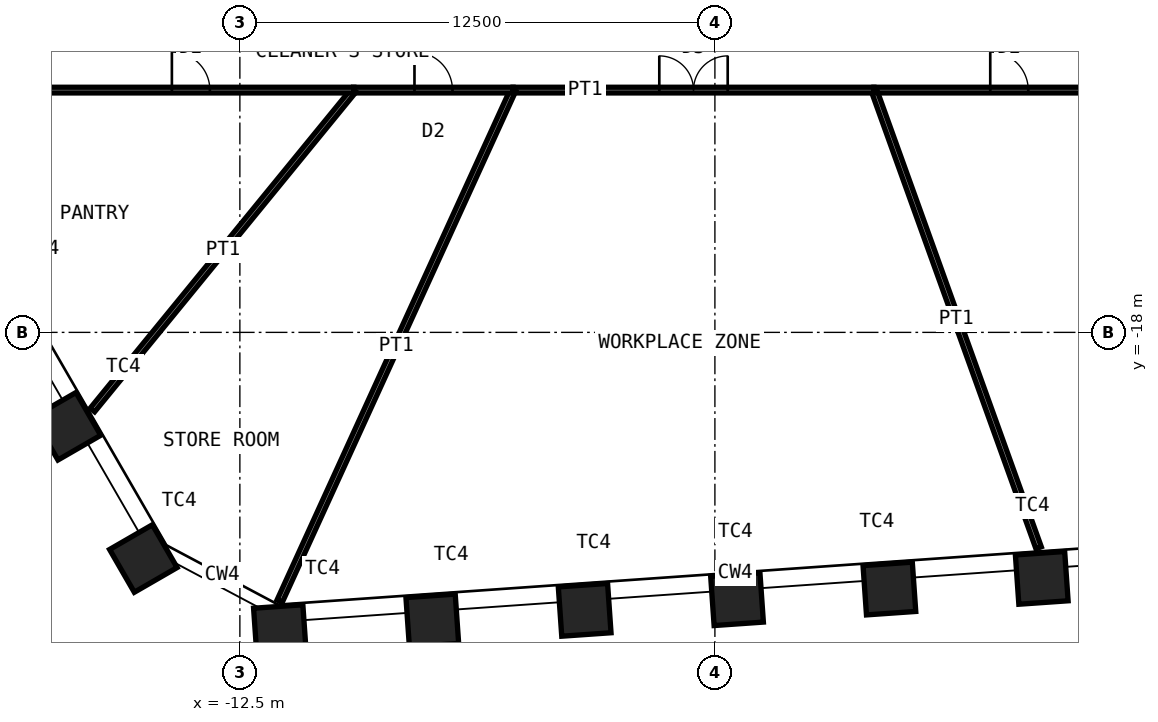
"""IFC4 building model, lengths in metres.
Left out: names, types, materials, properties, quantities, classifications, styles, units other than length and angle.
Written with IfcOpenShell. Run it as: python <this file> out.ifc"""

import sys

from ifc_helpers import new_model, si_unit, direction, frame, frame_2d, origin, origin_2d, place, context, subcontext, project, spatial, rectangle, hollow_rectangle, extrude, element, fill, save


model = new_model("IFC4")
c1 = context("Model", 3, precision=1e-05, world=origin(), true_north=direction((0.0, 1.0)))
c2 = subcontext(c1, "Body", "Model", "MODEL_VIEW")
j1 = project(units=[si_unit("LENGTHUNIT", "METRE"), si_unit("PLANEANGLEUNIT", "RADIAN")], contexts=[c1])
p1 = place(None, origin())
s1 = spatial("IfcSite", under=j1, at=p1, CompositionType="ELEMENT")
p2 = place(p1, origin())
s2 = spatial("IfcBuilding", under=s1, at=p2, CompositionType="ELEMENT")
p3 = place(p2, frame((0.0, 0.0, 157.6)))
s3 = spatial("IfcBuildingStorey", under=s2, at=p3, CompositionType="ELEMENT", Elevation=157.6)
for number, where, z_axis, x_axis in (
    (1, (8.601, -24.46, 0.0), (0.0, 0.0, 1.0), (0.998, 0.07, 0.0)),
    (2, (4.592, -24.74, 0.0), (0.0, 0.0, 1.0), (0.998, 0.07, 0.0)),
    (3, (0.582, -25.02, 0.0), (0.0, 0.0, 1.0), (0.998, 0.07, 0.0)),
    (4, (-3.427, -25.301, 0.0), (0.0, 0.0, 1.0), (0.998, 0.07, 0.0)),
    (5, (-7.436, -25.581, 0.0), (0.0, 0.0, 1.0), (0.998, 0.07, 0.0)),
    (6, (-11.446, -25.861, 0.0), (0.0, 0.0, 1.0), (0.998, 0.07, 0.0)),
    (7, (-15.04, -23.95, 0.0), (0.0, 0.0, 1.0), (0.5, -0.866, 0.0)),
    (8, (-17.049, -20.47, 0.0), (0.0, 0.0, 1.0), (0.5, -0.866, 0.0)),
):
    element("IfcColumn", number, at=place(p3, frame(where, z_axis=z_axis, x_axis=x_axis)), inside=s3, PredefinedType="COLUMN", context=c2, shape_type="SweptSolid", body=[
        extrude(hollow_rectangle(XDim=1.3, YDim=1.3, WallThickness=0.1, at=origin_2d()), origin(), (0.0, 0.0, 1.0), 4.2),
    ])
p4 = place(p3, frame((11.307, -11.625, 0.0), z_axis=(0.0, 0.0, 1.0), x_axis=(-1.0, 0.0, 0.0)))
e9 = element("IfcWall", 9, at=p4, inside=s3, PredefinedType="PARTITIONING", context=c2, shape_type="SweptSolid", body=[
    extrude(rectangle(XDim=7.123, YDim=0.15, at=frame_2d((3.562, 0.0))), origin(), (0.0, 0.0, 1.0), 4.03),
])
p5 = place(p4, frame((3.062, 0.0, 0.0)))
e10 = element("IfcOpeningElement", 10, at=p5, cuts=e9, PredefinedType="OPENING", context=c2, shape_type="SweptSolid", body=[
    extrude(rectangle(XDim=1.0, YDim=2.4, at=frame_2d((0.5, 1.2))), frame((0.0, 0.085, 0.0), z_axis=(0.0, -1.0, 0.0), x_axis=(1.0, 0.0, 0.0)), (0.0, 0.0, 1.0), 0.17),
])
p6 = place(p3, frame((8.518, -23.667, 0.0), z_axis=(0.0, 0.0, 1.0), x_axis=(-0.338635030469, 0.940917805198, 0.0)))
e11 = element("IfcWall", 11, at=p6, inside=s3, PredefinedType="PARTITIONING", context=c2, shape_type="SweptSolid", body=[
    extrude(rectangle(XDim=12.798, YDim=0.15, at=frame_2d((6.399, 0.0))), origin(), (0.0, 0.0, 1.0), 3.33),
])
p7 = place(p3, frame((4.184, -11.625, 0.0), z_axis=(0.0, 0.0, 1.0), x_axis=(-1.0, 0.0, 0.0)))
e12 = element("IfcWall", 12, at=p7, inside=s3, PredefinedType="PARTITIONING", context=c2, shape_type="SweptSolid", body=[
    extrude(rectangle(XDim=9.494, YDim=0.15, at=frame_2d((4.747, 0.0))), origin(), (0.0, 0.0, 1.0), 4.03),
])
p8 = place(p7, frame((3.847, 0.0, 0.0)))
e13 = element("IfcOpeningElement", 13, at=p8, cuts=e12, PredefinedType="OPENING", context=c2, shape_type="SweptSolid", body=[
    extrude(rectangle(XDim=1.8, YDim=2.4, at=frame_2d((0.9, 1.2))), frame((0.0, 0.085, 0.0), z_axis=(0.0, -1.0, 0.0), x_axis=(1.0, 0.0, 0.0)), (0.0, 0.0, 1.0), 0.17),
])
p9 = place(p3, frame((-11.453, -25.072, 0.0), z_axis=(0.0, 0.0, 1.0), x_axis=(0.415494357555, 0.909595755729, 0.0)))
e14 = element("IfcWall", 14, at=p9, inside=s3, PredefinedType="PARTITIONING", context=c2, shape_type="SweptSolid", body=[
    extrude(rectangle(XDim=14.784, YDim=0.15, at=frame_2d((7.392, 0.0))), origin(), (0.0, 0.0, 1.0), 2.93),
])
p10 = place(p3, frame((-5.31, -11.625, 0.0), z_axis=(0.0, 0.0, 1.0), x_axis=(-1.0, 0.0, 0.0)))
e15 = element("IfcWall", 15, at=p10, inside=s3, PredefinedType="PARTITIONING", context=c2, shape_type="SweptSolid", body=[
    extrude(rectangle(XDim=4.19, YDim=0.15, at=frame_2d((2.095, 0.0))), origin(), (0.0, 0.0, 1.0), 4.03),
])
p11 = place(p10, frame((1.595, 0.0, 0.0)))
e16 = element("IfcOpeningElement", 16, at=p11, cuts=e15, PredefinedType="OPENING", context=c2, shape_type="SweptSolid", body=[
    extrude(rectangle(XDim=1.0, YDim=2.4, at=frame_2d((0.5, 1.2))), frame((0.0, 0.085, 0.0), z_axis=(0.0, -1.0, 0.0), x_axis=(1.0, 0.0, 0.0)), (0.0, 0.0, 1.0), 0.17),
])
p12 = place(p3, frame((-16.38, -20.042, 0.0), z_axis=(0.0, 0.0, 1.0), x_axis=(0.632814540967, 0.774303400962, 0.0)))
e17 = element("IfcWall", 17, at=p12, inside=s3, PredefinedType="PARTITIONING", context=c2, shape_type="SweptSolid", body=[
    extrude(rectangle(XDim=10.871, YDim=0.15, at=frame_2d((5.435, 0.0))), origin(), (0.0, 0.0, 1.0), 3.33),
])
p13 = place(p3, frame((-9.501, -11.625, 0.0), z_axis=(0.0, 0.0, 1.0), x_axis=(-1.0, 0.0, 0.0)))
e18 = element("IfcWall", 18, at=p13, inside=s3, PredefinedType="PARTITIONING", context=c2, shape_type="SweptSolid", body=[
    extrude(rectangle(XDim=8.577, YDim=0.15, at=frame_2d((4.288, 0.0))), origin(), (0.0, 0.0, 1.0), 4.03),
])
p14 = place(p13, frame((3.788, 0.0, 0.0)))
e19 = element("IfcOpeningElement", 19, at=p14, cuts=e18, PredefinedType="OPENING", context=c2, shape_type="SweptSolid", body=[
    extrude(rectangle(XDim=1.0, YDim=2.4, at=frame_2d((0.5, 1.2))), frame((0.0, 0.085, 0.0), z_axis=(0.0, -1.0, 0.0), x_axis=(1.0, 0.0, 0.0)), (0.0, 0.0, 1.0), 0.17),
])
p15 = place(p5, origin())
e20 = element("IfcDoor", 20, at=p15, inside=s3, OperationType="SINGLE_SWING_RIGHT", PredefinedType="DOOR", context=c2, shape_type="SweptSolid", body=[
    extrude(rectangle(XDim=1.0, YDim=2.4, at=frame_2d((0.5, 1.2))), frame((0.0, 0.025, 0.0), z_axis=(0.0, -1.0, 0.0), x_axis=(1.0, 0.0, 0.0)), (0.0, 0.0, 1.0), 0.05),
])
fill(e10, e20)
p16 = place(p8, origin())
e21 = element("IfcDoor", 21, at=p16, inside=s3, OperationType="DOUBLE_DOOR_DOUBLE_SWING", PredefinedType="DOOR", context=c2, shape_type="SweptSolid", body=[
    extrude(rectangle(XDim=1.8, YDim=2.4, at=frame_2d((0.9, 1.2))), frame((0.0, 0.025, 0.0), z_axis=(0.0, -1.0, 0.0), x_axis=(1.0, 0.0, 0.0)), (0.0, 0.0, 1.0), 0.05),
])
fill(e13, e21)
p17 = place(p11, origin())
e22 = element("IfcDoor", 22, at=p17, inside=s3, OperationType="SINGLE_SWING_RIGHT", PredefinedType="DOOR", context=c2, shape_type="SweptSolid", body=[
    extrude(rectangle(XDim=1.0, YDim=2.4, at=frame_2d((0.5, 1.2))), frame((0.0, 0.025, 0.0), z_axis=(0.0, -1.0, 0.0), x_axis=(1.0, 0.0, 0.0)), (0.0, 0.0, 1.0), 0.05),
])
fill(e16, e22)
p18 = place(p14, origin())
e23 = element("IfcDoor", 23, at=p18, inside=s3, OperationType="SINGLE_SWING_RIGHT", PredefinedType="DOOR", context=c2, shape_type="SweptSolid", body=[
    extrude(rectangle(XDim=1.0, YDim=2.4, at=frame_2d((0.5, 1.2))), frame((0.0, 0.025, 0.0), z_axis=(0.0, -1.0, 0.0), x_axis=(1.0, 0.0, 0.0)), (0.0, 0.0, 1.0), 0.05),
])
fill(e19, e23)
save(model, sys.argv[1])
